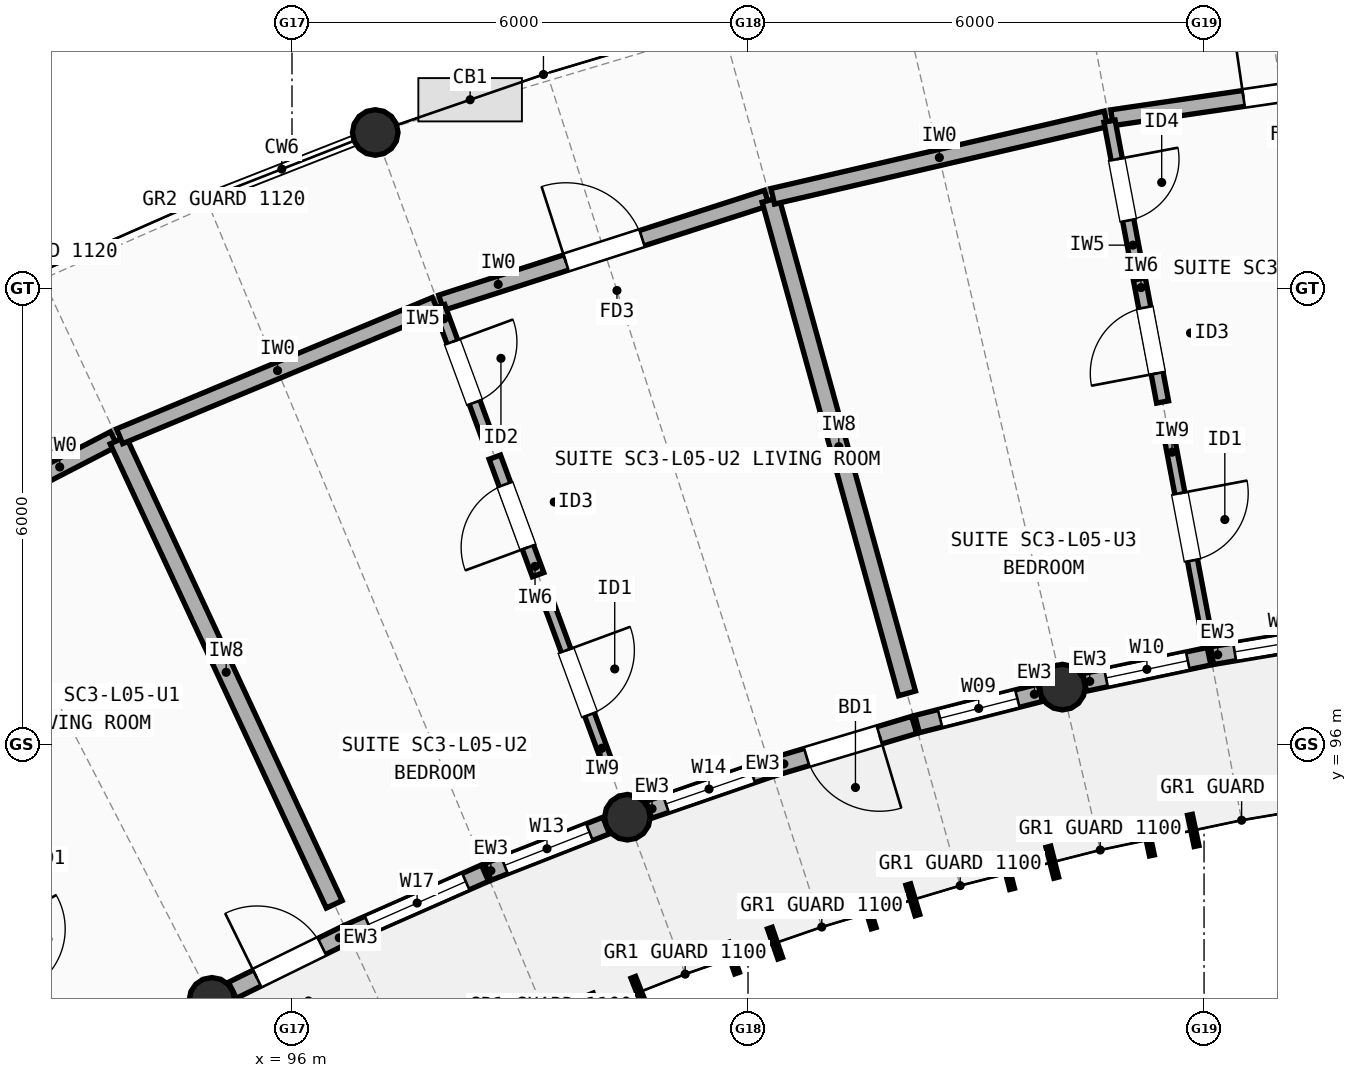
"""IFC4 building model, lengths in metres.
Left out: names, types, materials, properties, quantities, classifications, styles, units other than length and angle.
Written with IfcOpenShell. Run it as: python <this file> out.ifc"""

import sys

from ifc_helpers import new_model, si_unit, direction, frame, frame_2d, origin, origin_2d, place, context, subcontext, project, spatial, rectangle, circle, extrude, element, fill, save


model = new_model("IFC4")
c1 = context("Model", 3, precision=1e-05, world=origin(), true_north=direction((0.0, 1.0)))
c2 = subcontext(c1, "Body", "Model", "MODEL_VIEW")
j1 = project(units=[si_unit("LENGTHUNIT", "METRE"), si_unit("PLANEANGLEUNIT", "RADIAN")], contexts=[c1])
p1 = place(None, origin())
s1 = spatial("IfcSite", under=j1, at=p1, CompositionType="ELEMENT")
p2 = place(p1, origin())
s2 = spatial("IfcBuilding", under=s1, at=p2, CompositionType="ELEMENT")
p3 = place(p2, frame((0.0, 0.0, 17.3)))
s3 = spatial("IfcBuildingStorey", under=s2, at=p3, CompositionType="ELEMENT", Elevation=17.3)
for number, where, z_axis, x_axis in (
    (1, (94.947, 92.634, 0.0), (0.0, 0.0, 1.0), (1.0, 0.0, 0.0)),
    (2, (100.413, 95.043, 0.0), (0.0, 0.0, 1.0), (1.0, 0.0, 0.0)),
    (3, (97.095, 104.052, 0.0), (0.0, 0.0, 1.0), (1.0, 0.0, 0.0)),
    (4, (106.136, 96.754, 0.0), (0.0, 0.0, 1.0), (1.0, 0.0, 0.0)),
):
    element("IfcColumn", number, at=place(p3, frame(where, z_axis=z_axis, x_axis=x_axis)), inside=s3, PredefinedType="COLUMN", context=c2, shape_type="SweptSolid", body=[
        extrude(circle(Radius=0.3, at=origin_2d()), origin(), (0.0, 0.0, 1.0), 2.94),
    ])
p4 = place(p3, frame((95.216, 92.766, 0.0), z_axis=(0.0, 0.0, 1.0), x_axis=(0.897558380725, 0.440895626186, 0.0)))
e5 = element("IfcWall", 5, at=p4, inside=s3, PredefinedType="STANDARD", context=c2, shape_type="SweptSolid", body=[
    extrude(rectangle(XDim=1.672, YDim=0.235, at=frame_2d((0.836, 0.0))), origin(), (0.0, 0.0, 1.0), 2.676),
])
p5 = place(p4, frame((0.361, 0.0, 0.0)))
e6 = element("IfcOpeningElement", 6, at=p5, cuts=e5, PredefinedType="OPENING", context=c2, shape_type="SweptSolid", body=[
    extrude(rectangle(XDim=0.95, YDim=2.12, at=frame_2d((0.475, 1.06))), frame((0.0, 0.127, 0.0), z_axis=(0.0, -1.0, 0.0), x_axis=(1.0, 0.0, 0.0)), (0.0, 0.0, 1.0), 0.255),
])
p6 = place(p3, frame((96.753, 93.521, 0.0), z_axis=(0.0, 0.0, 1.0), x_axis=(0.915126852478, 0.403166025197, 0.0)))
e7 = element("IfcWall", 7, at=p6, inside=s3, PredefinedType="STANDARD", context=c2, shape_type="SweptSolid", body=[
    extrude(rectangle(XDim=1.952, YDim=0.235, at=frame_2d((0.976, 0.0))), origin(), (0.0, 0.0, 1.0), 2.676),
])
p7 = place(p6, frame((0.276, 0.0, 0.85)))
e8 = element("IfcOpeningElement", 8, at=p7, cuts=e7, PredefinedType="OPENING", context=c2, shape_type="SweptSolid", body=[
    extrude(rectangle(XDim=1.4, YDim=1.5, at=frame_2d((0.7, 0.75))), frame((0.0, 0.127, 0.0), z_axis=(0.0, -1.0, 0.0), x_axis=(1.0, 0.0, 0.0)), (0.0, 0.0, 1.0), 0.255),
])
p8 = place(p3, frame((98.577, 94.323, 0.0), z_axis=(0.0, 0.0, 1.0), x_axis=(0.930962495902, 0.365114819233, 0.0)))
e9 = element("IfcWall", 9, at=p8, inside=s3, PredefinedType="STANDARD", context=c2, shape_type="SweptSolid", body=[
    extrude(rectangle(XDim=1.672, YDim=0.235, at=frame_2d((0.836, 0.0))), origin(), (0.0, 0.0, 1.0), 2.676),
])
p9 = place(p8, frame((0.236, 0.0, 0.85)))
e10 = element("IfcOpeningElement", 10, at=p9, cuts=e9, PredefinedType="OPENING", context=c2, shape_type="SweptSolid", body=[
    extrude(rectangle(XDim=1.2, YDim=1.45, at=frame_2d((0.6, 0.725))), frame((0.0, 0.127, 0.0), z_axis=(0.0, -1.0, 0.0), x_axis=(1.0, 0.0, 0.0)), (0.0, 0.0, 1.0), 0.255),
])
p10 = place(p3, frame((100.697, 95.141, 0.0), z_axis=(0.0, 0.0, 1.0), x_axis=(0.94537763557, 0.32597718657, 0.0)))
e11 = element("IfcWall", 11, at=p10, inside=s3, PredefinedType="STANDARD", context=c2, shape_type="SweptSolid", body=[
    extrude(rectangle(XDim=1.672, YDim=0.235, at=frame_2d((0.836, 0.0))), origin(), (0.0, 0.0, 1.0), 2.676),
])
p11 = place(p10, frame((0.236, 0.0, 0.85)))
e12 = element("IfcOpeningElement", 12, at=p11, cuts=e11, PredefinedType="OPENING", context=c2, shape_type="SweptSolid", body=[
    extrude(rectangle(XDim=1.2, YDim=1.5, at=frame_2d((0.6, 0.75))), frame((0.0, 0.127, 0.0), z_axis=(0.0, -1.0, 0.0), x_axis=(1.0, 0.0, 0.0)), (0.0, 0.0, 1.0), 0.255),
])
p12 = place(p3, frame((102.316, 95.698, 0.0), z_axis=(0.0, 0.0, 1.0), x_axis=(0.95807718441, 0.286510224446, 0.0)))
e13 = element("IfcWall", 13, at=p12, inside=s3, PredefinedType="STANDARD", context=c2, shape_type="SweptSolid", body=[
    extrude(rectangle(XDim=1.952, YDim=0.235, at=frame_2d((0.976, 0.0))), origin(), (0.0, 0.0, 1.0), 2.676),
])
p13 = place(p12, frame((0.476, 0.0, 0.0)))
e14 = element("IfcOpeningElement", 14, at=p13, cuts=e13, PredefinedType="OPENING", context=c2, shape_type="SweptSolid", body=[
    extrude(rectangle(XDim=1.0, YDim=2.15, at=frame_2d((0.5, 1.075))), frame((0.0, 0.127, 0.0), z_axis=(0.0, -1.0, 0.0), x_axis=(1.0, 0.0, 0.0)), (0.0, 0.0, 1.0), 0.255),
])
p14 = place(p3, frame((104.225, 96.268, 0.0), z_axis=(0.0, 0.0, 1.0), x_axis=(0.969164394975, 0.246415047254, 0.0)))
e15 = element("IfcWall", 15, at=p14, inside=s3, PredefinedType="STANDARD", context=c2, shape_type="SweptSolid", body=[
    extrude(rectangle(XDim=1.672, YDim=0.235, at=frame_2d((0.836, 0.0))), origin(), (0.0, 0.0, 1.0), 2.676),
])
p15 = place(p14, frame((0.311, 0.0, 0.85)))
e16 = element("IfcOpeningElement", 16, at=p15, cuts=e15, PredefinedType="OPENING", context=c2, shape_type="SweptSolid", body=[
    extrude(rectangle(XDim=1.05, YDim=1.35, at=frame_2d((0.525, 0.675))), frame((0.0, 0.127, 0.0), z_axis=(0.0, -1.0, 0.0), x_axis=(1.0, 0.0, 0.0)), (0.0, 0.0, 1.0), 0.255),
])
p16 = place(p3, frame((106.43, 96.816, 0.0), z_axis=(0.0, 0.0, 1.0), x_axis=(0.978524995622, 0.206128195408, 0.0)))
e17 = element("IfcWall", 17, at=p16, inside=s3, PredefinedType="STANDARD", context=c2, shape_type="SweptSolid", body=[
    extrude(rectangle(XDim=1.672, YDim=0.235, at=frame_2d((0.836, 0.0))), origin(), (0.0, 0.0, 1.0), 2.676),
])
p17 = place(p16, frame((0.286, 0.0, 0.85)))
e18 = element("IfcOpeningElement", 18, at=p17, cuts=e17, PredefinedType="OPENING", context=c2, shape_type="SweptSolid", body=[
    extrude(rectangle(XDim=1.1, YDim=1.45, at=frame_2d((0.55, 0.725))), frame((0.0, 0.127, 0.0), z_axis=(0.0, -1.0, 0.0), x_axis=(1.0, 0.0, 0.0)), (0.0, 0.0, 1.0), 0.255),
])
p18 = place(p3, frame((108.105, 97.168, 0.0), z_axis=(0.0, 0.0, 1.0), x_axis=(0.986241418229, 0.165311418144, 0.0)))
e19 = element("IfcWall", 19, at=p18, inside=s3, PredefinedType="STANDARD", context=c2, shape_type="SweptSolid", body=[
    extrude(rectangle(XDim=1.952, YDim=0.235, at=frame_2d((0.976, 0.0))), origin(), (0.0, 0.0, 1.0), 2.676),
])
p19 = place(p18, frame((0.301, 0.0, 0.85)))
e20 = element("IfcOpeningElement", 20, at=p19, cuts=e19, PredefinedType="OPENING", context=c2, shape_type="SweptSolid", body=[
    extrude(rectangle(XDim=1.35, YDim=1.5, at=frame_2d((0.675, 0.75))), frame((0.0, 0.127, 0.0), z_axis=(0.0, -1.0, 0.0), x_axis=(1.0, 0.0, 0.0)), (0.0, 0.0, 1.0), 0.255),
])
p20 = place(p3, frame((89.661, 97.953, 0.0), z_axis=(0.0, 0.0, 1.0), x_axis=(0.888203141908, 0.459450953536, 0.0)))
e21 = element("IfcWall", 21, at=p20, inside=s3, PredefinedType="SOLIDWALL", context=c2, shape_type="SweptSolid", body=[
    extrude(rectangle(XDim=4.501, YDim=0.21, at=frame_2d((2.25, 0.0))), origin(), (0.0, 0.0, 1.0), 2.734),
])
p21 = place(p20, frame((1.761, 0.0, 0.0)))
e22 = element("IfcOpeningElement", 22, at=p21, cuts=e21, PredefinedType="OPENING", context=c2, shape_type="SweptSolid", body=[
    extrude(rectangle(XDim=0.98, YDim=2.15, at=frame_2d((0.49, 1.075))), frame((0.0, 0.115, 0.0), z_axis=(0.0, -1.0, 0.0), x_axis=(1.0, 0.0, 0.0)), (0.0, 0.0, 1.0), 0.23),
])
p22 = place(p3, frame((93.034, 91.967, 0.0), z_axis=(0.0, 0.0, 1.0), x_axis=(-0.495951127449, 0.868350435701, 0.0)))
e23 = element("IfcWall", 23, at=p22, inside=s3, PredefinedType="PARTITIONING", context=c2, shape_type="SweptSolid", body=[
    extrude(rectangle(XDim=2.8, YDim=0.135, at=frame_2d((1.4, 0.0))), origin(), (0.0, 0.0, 1.0), 2.714),
])
p23 = place(p22, frame((0.95, 0.0, 0.0)))
e24 = element("IfcOpeningElement", 24, at=p23, cuts=e23, PredefinedType="OPENING", context=c2, shape_type="SweptSolid", body=[
    extrude(rectangle(XDim=0.9, YDim=2.1, at=frame_2d((0.45, 1.05))), frame((0.0, 0.077, 0.0), z_axis=(0.0, -1.0, 0.0), x_axis=(1.0, 0.0, 0.0)), (0.0, 0.0, 1.0), 0.155),
])
p24 = place(p3, frame((96.556, 93.897, 0.0), z_axis=(0.0, 0.0, 1.0), x_axis=(-0.422206763189, 0.906499558256, 0.0)))
e25 = element("IfcWall", 25, at=p24, inside=s3, PredefinedType="SOLIDWALL", context=c2, shape_type="SweptSolid", body=[
    extrude(rectangle(XDim=6.736, YDim=0.23, at=frame_2d((3.368, 0.0))), origin(), (0.0, 0.0, 1.0), 2.754),
])
p25 = place(p3, frame((93.732, 100.055, 0.0), z_axis=(0.0, 0.0, 1.0), x_axis=(0.923267760269, 0.384157054925, 0.0)))
e26 = element("IfcWall", 26, at=p25, inside=s3, PredefinedType="SOLIDWALL", context=c2, shape_type="SweptSolid", body=[
    extrude(rectangle(XDim=4.501, YDim=0.21, at=frame_2d((2.251, 0.0))), origin(), (0.0, 0.0, 1.0), 2.714),
])
p26 = place(p3, frame((97.963, 101.812, 0.0), z_axis=(0.0, 0.0, 1.0), x_axis=(0.95193992138, 0.306284812035, 0.0)))
e27 = element("IfcWall", 27, at=p26, inside=s3, PredefinedType="SOLIDWALL", context=c2, shape_type="SweptSolid", body=[
    extrude(rectangle(XDim=4.501, YDim=0.21, at=frame_2d((2.25, 0.0))), origin(), (0.0, 0.0, 1.0), 2.754),
])
p27 = place(p26, frame((1.726, 0.0, 0.0)))
e28 = element("IfcOpeningElement", 28, at=p27, cuts=e27, PredefinedType="OPENING", context=c2, shape_type="SweptSolid", body=[
    extrude(rectangle(XDim=1.05, YDim=2.15, at=frame_2d((0.525, 1.075))), frame((0.0, 0.115, 0.0), z_axis=(0.0, -1.0, 0.0), x_axis=(1.0, 0.0, 0.0)), (0.0, 0.0, 1.0), 0.23),
])
p28 = place(p3, frame((100.189, 95.651, 0.0), z_axis=(0.0, 0.0, 1.0), x_axis=(-0.34555023948, 0.938400251489, 0.0)))
e29 = element("IfcWall", 29, at=p28, inside=s3, PredefinedType="PARTITIONING", context=c2, shape_type="SweptSolid", body=[
    extrude(rectangle(XDim=2.48, YDim=0.135, at=frame_2d((1.24, 0.0))), origin(), (0.0, 0.0, 1.0), 2.734),
])
p29 = place(p28, frame((0.79, 0.0, 0.0)))
e30 = element("IfcOpeningElement", 30, at=p29, cuts=e29, PredefinedType="OPENING", context=c2, shape_type="SweptSolid", body=[
    extrude(rectangle(XDim=0.9, YDim=2.1, at=frame_2d((0.45, 1.05))), frame((0.0, 0.077, 0.0), z_axis=(0.0, -1.0, 0.0), x_axis=(1.0, 0.0, 0.0)), (0.0, 0.0, 1.0), 0.155),
])
p30 = place(p3, frame((99.238, 98.233, 0.0), z_axis=(0.0, 0.0, 1.0), x_axis=(-0.345581795697, 0.938388630836, 0.0)))
e31 = element("IfcWall", 31, at=p30, inside=s3, PredefinedType="PLUMBINGWALL", context=c2, shape_type="SweptSolid", body=[
    extrude(rectangle(XDim=1.648, YDim=0.16, at=frame_2d((0.824, 0.0))), origin(), (0.0, 0.0, 1.0), 2.734),
])
p31 = place(p30, frame((0.384, 0.0, 0.0)))
e32 = element("IfcOpeningElement", 32, at=p31, cuts=e31, PredefinedType="OPENING", context=c2, shape_type="SweptSolid", body=[
    extrude(rectangle(XDim=0.88, YDim=2.1, at=frame_2d((0.44, 1.05))), frame((0.0, 0.09, 0.0), z_axis=(0.0, -1.0, 0.0), x_axis=(1.0, 0.0, 0.0)), (0.0, 0.0, 1.0), 0.18),
])
p32 = place(p3, frame((98.574, 100.035, 0.0), z_axis=(0.0, 0.0, 1.0), x_axis=(-0.345490154584, 0.938422374566, 0.0)))
e33 = element("IfcWall", 33, at=p32, inside=s3, PredefinedType="PARTITIONING", context=c2, shape_type="SweptSolid", body=[
    extrude(rectangle(XDim=1.84, YDim=0.15, at=frame_2d((0.92, 0.0))), origin(), (0.0, 0.0, 1.0), 2.734),
])
p33 = place(p32, frame((0.495, 0.0, 0.0)))
e34 = element("IfcOpeningElement", 34, at=p33, cuts=e33, PredefinedType="OPENING", context=c2, shape_type="SweptSolid", body=[
    extrude(rectangle(XDim=0.85, YDim=2.1, at=frame_2d((0.425, 1.05))), frame((0.0, 0.085, 0.0), z_axis=(0.0, -1.0, 0.0), x_axis=(1.0, 0.0, 0.0)), (0.0, 0.0, 1.0), 0.17),
])
p34 = place(p3, frame((104.092, 96.672, 0.0), z_axis=(0.0, 0.0, 1.0), x_axis=(-0.266578174631, 0.963813299768, 0.0)))
e35 = element("IfcWall", 35, at=p34, inside=s3, PredefinedType="SOLIDWALL", context=c2, shape_type="SweptSolid", body=[
    extrude(rectangle(XDim=6.736, YDim=0.23, at=frame_2d((3.368, 0.0))), origin(), (0.0, 0.0, 1.0), 2.714),
])
p35 = place(p3, frame((102.325, 103.212, 0.0), z_axis=(0.0, 0.0, 1.0), x_axis=(0.974052809246, 0.226320844821, 0.0)))
e36 = element("IfcWall", 36, at=p35, inside=s3, PredefinedType="SOLIDWALL", context=c2, shape_type="SweptSolid", body=[
    extrude(rectangle(XDim=4.501, YDim=0.21, at=frame_2d((2.251, 0.0))), origin(), (0.0, 0.0, 1.0), 2.734),
])
p36 = place(p3, frame((106.788, 104.246, 0.0), z_axis=(0.0, 0.0, 1.0), x_axis=(0.98946769641, 0.14475385232, 0.0)))
e37 = element("IfcWall", 37, at=p36, inside=s3, PredefinedType="SOLIDWALL", context=c2, shape_type="SweptSolid", body=[
    extrude(rectangle(XDim=4.501, YDim=0.21, at=frame_2d((2.251, 0.0))), origin(), (0.0, 0.0, 1.0), 2.714),
])
p37 = place(p36, frame((1.751, 0.0, 0.0)))
e38 = element("IfcOpeningElement", 38, at=p37, cuts=e37, PredefinedType="OPENING", context=c2, shape_type="SweptSolid", body=[
    extrude(rectangle(XDim=1.0, YDim=2.15, at=frame_2d((0.5, 1.075))), frame((0.0, 0.115, 0.0), z_axis=(0.0, -1.0, 0.0), x_axis=(1.0, 0.0, 0.0)), (0.0, 0.0, 1.0), 0.23),
])
p38 = place(p3, frame((108.025, 97.487, 0.0), z_axis=(0.0, 0.0, 1.0), x_axis=(-0.185725576604, 0.982601653874, 0.0)))
e39 = element("IfcWall", 39, at=p38, inside=s3, PredefinedType="PARTITIONING", context=c2, shape_type="SweptSolid", body=[
    extrude(rectangle(XDim=2.8, YDim=0.135, at=frame_2d((1.4, 0.0))), origin(), (0.0, 0.0, 1.0), 2.754),
])
p39 = place(p38, frame((0.95, 0.0, 0.0)))
e40 = element("IfcOpeningElement", 40, at=p39, cuts=e39, PredefinedType="OPENING", context=c2, shape_type="SweptSolid", body=[
    extrude(rectangle(XDim=0.9, YDim=2.1, at=frame_2d((0.45, 1.05))), frame((0.0, 0.077, 0.0), z_axis=(0.0, -1.0, 0.0), x_axis=(1.0, 0.0, 0.0)), (0.0, 0.0, 1.0), 0.155),
])
p40 = place(p3, frame((107.454, 100.506, 0.0), z_axis=(0.0, 0.0, 1.0), x_axis=(-0.185764109712, 0.98259436979, 0.0)))
e41 = element("IfcWall", 41, at=p40, inside=s3, PredefinedType="PLUMBINGWALL", context=c2, shape_type="SweptSolid", body=[
    extrude(rectangle(XDim=1.648, YDim=0.16, at=frame_2d((0.824, 0.0))), origin(), (0.0, 0.0, 1.0), 2.754),
])
p41 = place(p40, frame((0.384, 0.0, 0.0)))
e42 = element("IfcOpeningElement", 42, at=p41, cuts=e41, PredefinedType="OPENING", context=c2, shape_type="SweptSolid", body=[
    extrude(rectangle(XDim=0.88, YDim=2.1, at=frame_2d((0.44, 1.05))), frame((0.0, 0.09, 0.0), z_axis=(0.0, -1.0, 0.0), x_axis=(1.0, 0.0, 0.0)), (0.0, 0.0, 1.0), 0.18),
])
p42 = place(p3, frame((107.098, 102.392, 0.0), z_axis=(0.0, 0.0, 1.0), x_axis=(-0.185746265255, 0.982597743201, 0.0)))
e43 = element("IfcWall", 43, at=p42, inside=s3, PredefinedType="PARTITIONING", context=c2, shape_type="SweptSolid", body=[
    extrude(rectangle(XDim=1.84, YDim=0.15, at=frame_2d((0.92, 0.0))), origin(), (0.0, 0.0, 1.0), 2.754),
])
p43 = place(p42, frame((0.51, 0.0, 0.0)))
e44 = element("IfcOpeningElement", 44, at=p43, cuts=e43, PredefinedType="OPENING", context=c2, shape_type="SweptSolid", body=[
    extrude(rectangle(XDim=0.82, YDim=2.08, at=frame_2d((0.41, 1.04))), frame((0.0, 0.085, 0.0), z_axis=(0.0, -1.0, 0.0), x_axis=(1.0, 0.0, 0.0)), (0.0, 0.0, 1.0), 0.17),
])
p44 = place(p5, frame((0.95, 0.0, 0.0), z_axis=(0.0, 0.0, 1.0), x_axis=(-1.0, 0.0, 0.0)))
e45 = element("IfcDoor", 45, at=p44, inside=s3, OperationType="SINGLE_SWING_LEFT", PredefinedType="DOOR", context=c2, shape_type="SweptSolid", body=[
    extrude(rectangle(XDim=0.95, YDim=2.12, at=frame_2d((0.475, 1.06))), frame((0.0, 0.025, 0.0), z_axis=(0.0, -1.0, 0.0), x_axis=(1.0, 0.0, 0.0)), (0.0, 0.0, 1.0), 0.05),
])
fill(e6, e45)
p45 = place(p7, origin())
e46 = element("IfcWindow", 46, at=p45, inside=s3, PartitioningType="SINGLE_PANEL", PredefinedType="WINDOW", context=c2, shape_type="SweptSolid", body=[
    extrude(rectangle(XDim=1.4, YDim=1.5, at=frame_2d((0.7, 0.75))), frame((0.0, 0.03, 0.0), z_axis=(0.0, -1.0, 0.0), x_axis=(1.0, 0.0, 0.0)), (0.0, 0.0, 1.0), 0.06),
])
fill(e8, e46)
p46 = place(p9, origin())
e47 = element("IfcWindow", 47, at=p46, inside=s3, PartitioningType="SINGLE_PANEL", PredefinedType="WINDOW", context=c2, shape_type="SweptSolid", body=[
    extrude(rectangle(XDim=1.2, YDim=1.45, at=frame_2d((0.6, 0.725))), frame((0.0, 0.03, 0.0), z_axis=(0.0, -1.0, 0.0), x_axis=(1.0, 0.0, 0.0)), (0.0, 0.0, 1.0), 0.06),
])
fill(e10, e47)
p47 = place(p11, origin())
e48 = element("IfcWindow", 48, at=p47, inside=s3, PartitioningType="SINGLE_PANEL", PredefinedType="WINDOW", context=c2, shape_type="SweptSolid", body=[
    extrude(rectangle(XDim=1.2, YDim=1.5, at=frame_2d((0.6, 0.75))), frame((0.0, 0.03, 0.0), z_axis=(0.0, -1.0, 0.0), x_axis=(1.0, 0.0, 0.0)), (0.0, 0.0, 1.0), 0.06),
])
fill(e12, e48)
p48 = place(p13, frame((1.0, 0.0, 0.0), z_axis=(0.0, 0.0, 1.0), x_axis=(-1.0, 0.0, 0.0)))
e49 = element("IfcDoor", 49, at=p48, inside=s3, OperationType="SINGLE_SWING_RIGHT", PredefinedType="DOOR", context=c2, shape_type="SweptSolid", body=[
    extrude(rectangle(XDim=1.0, YDim=2.15, at=frame_2d((0.5, 1.075))), frame((0.0, 0.025, 0.0), z_axis=(0.0, -1.0, 0.0), x_axis=(1.0, 0.0, 0.0)), (0.0, 0.0, 1.0), 0.05),
])
fill(e14, e49)
p49 = place(p15, origin())
e50 = element("IfcWindow", 50, at=p49, inside=s3, PartitioningType="SINGLE_PANEL", PredefinedType="WINDOW", context=c2, shape_type="SweptSolid", body=[
    extrude(rectangle(XDim=1.05, YDim=1.35, at=frame_2d((0.525, 0.675))), frame((0.0, 0.03, 0.0), z_axis=(0.0, -1.0, 0.0), x_axis=(1.0, 0.0, 0.0)), (0.0, 0.0, 1.0), 0.06),
])
fill(e16, e50)
p50 = place(p17, origin())
e51 = element("IfcWindow", 51, at=p50, inside=s3, PartitioningType="SINGLE_PANEL", PredefinedType="WINDOW", context=c2, shape_type="SweptSolid", body=[
    extrude(rectangle(XDim=1.1, YDim=1.45, at=frame_2d((0.55, 0.725))), frame((0.0, 0.03, 0.0), z_axis=(0.0, -1.0, 0.0), x_axis=(1.0, 0.0, 0.0)), (0.0, 0.0, 1.0), 0.06),
])
fill(e18, e51)
p51 = place(p19, origin())
e52 = element("IfcWindow", 52, at=p51, inside=s3, PartitioningType="SINGLE_PANEL", PredefinedType="WINDOW", context=c2, shape_type="SweptSolid", body=[
    extrude(rectangle(XDim=1.35, YDim=1.5, at=frame_2d((0.675, 0.75))), frame((0.0, 0.03, 0.0), z_axis=(0.0, -1.0, 0.0), x_axis=(1.0, 0.0, 0.0)), (0.0, 0.0, 1.0), 0.06),
])
fill(e20, e52)
p52 = place(p27, origin())
e53 = element("IfcDoor", 53, at=p52, inside=s3, OperationType="SINGLE_SWING_LEFT", PredefinedType="DOOR", context=c2, shape_type="SweptSolid", body=[
    extrude(rectangle(XDim=1.05, YDim=2.15, at=frame_2d((0.525, 1.075))), frame((0.0, 0.025, 0.0), z_axis=(0.0, -1.0, 0.0), x_axis=(1.0, 0.0, 0.0)), (0.0, 0.0, 1.0), 0.05),
])
fill(e28, e53)
p53 = place(p29, origin())
e54 = element("IfcDoor", 54, at=p53, inside=s3, OperationType="SINGLE_SWING_RIGHT", PredefinedType="DOOR", context=c2, shape_type="SweptSolid", body=[
    extrude(rectangle(XDim=0.9, YDim=2.1, at=frame_2d((0.45, 1.05))), frame((0.0, 0.025, 0.0), z_axis=(0.0, -1.0, 0.0), x_axis=(1.0, 0.0, 0.0)), (0.0, 0.0, 1.0), 0.05),
])
fill(e30, e54)
p54 = place(p31, origin())
e55 = element("IfcDoor", 55, at=p54, inside=s3, OperationType="SINGLE_SWING_LEFT", PredefinedType="DOOR", context=c2, shape_type="SweptSolid", body=[
    extrude(rectangle(XDim=0.88, YDim=2.1, at=frame_2d((0.44, 1.05))), frame((0.0, 0.025, 0.0), z_axis=(0.0, -1.0, 0.0), x_axis=(1.0, 0.0, 0.0)), (0.0, 0.0, 1.0), 0.05),
])
fill(e32, e55)
p55 = place(p33, origin())
e56 = element("IfcDoor", 56, at=p55, inside=s3, OperationType="SINGLE_SWING_RIGHT", PredefinedType="DOOR", context=c2, shape_type="SweptSolid", body=[
    extrude(rectangle(XDim=0.85, YDim=2.1, at=frame_2d((0.425, 1.05))), frame((0.0, 0.025, 0.0), z_axis=(0.0, -1.0, 0.0), x_axis=(1.0, 0.0, 0.0)), (0.0, 0.0, 1.0), 0.05),
])
fill(e34, e56)
p56 = place(p37, origin())
e57 = element("IfcDoor", 57, at=p56, inside=s3, OperationType="SINGLE_SWING_LEFT", PredefinedType="DOOR", context=c2, shape_type="SweptSolid", body=[
    extrude(rectangle(XDim=1.0, YDim=2.15, at=frame_2d((0.5, 1.075))), frame((0.0, 0.025, 0.0), z_axis=(0.0, -1.0, 0.0), x_axis=(1.0, 0.0, 0.0)), (0.0, 0.0, 1.0), 0.05),
])
fill(e38, e57)
p57 = place(p39, origin())
e58 = element("IfcDoor", 58, at=p57, inside=s3, OperationType="SINGLE_SWING_RIGHT", PredefinedType="DOOR", context=c2, shape_type="SweptSolid", body=[
    extrude(rectangle(XDim=0.9, YDim=2.1, at=frame_2d((0.45, 1.05))), frame((0.0, 0.025, 0.0), z_axis=(0.0, -1.0, 0.0), x_axis=(1.0, 0.0, 0.0)), (0.0, 0.0, 1.0), 0.05),
])
fill(e40, e58)
p58 = place(p41, origin())
e59 = element("IfcDoor", 59, at=p58, inside=s3, OperationType="SINGLE_SWING_LEFT", PredefinedType="DOOR", context=c2, shape_type="SweptSolid", body=[
    extrude(rectangle(XDim=0.88, YDim=2.1, at=frame_2d((0.44, 1.05))), frame((0.0, 0.025, 0.0), z_axis=(0.0, -1.0, 0.0), x_axis=(1.0, 0.0, 0.0)), (0.0, 0.0, 1.0), 0.05),
])
fill(e42, e59)
p59 = place(p43, origin())
e60 = element("IfcDoor", 60, at=p59, inside=s3, OperationType="SINGLE_SWING_RIGHT", PredefinedType="DOOR", context=c2, shape_type="SweptSolid", body=[
    extrude(rectangle(XDim=0.82, YDim=2.08, at=frame_2d((0.41, 1.04))), frame((0.0, 0.025, 0.0), z_axis=(0.0, -1.0, 0.0), x_axis=(1.0, 0.0, 0.0)), (0.0, 0.0, 1.0), 0.05),
])
fill(e44, e60)
save(model, sys.argv[1])
